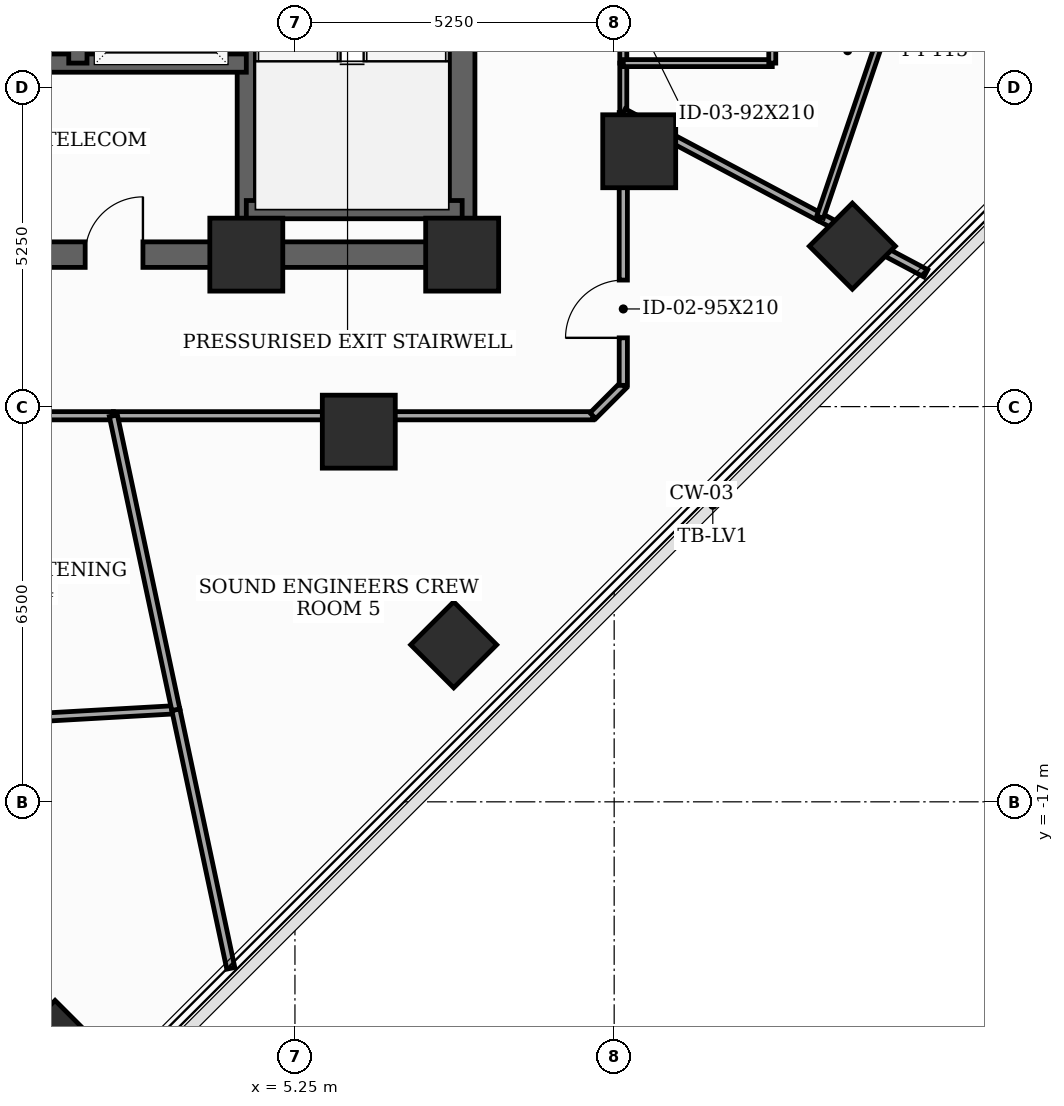
"""IFC4 building model, lengths in metres.
Left out: names, types, materials, properties, quantities, classifications, styles, units other than length and angle.
Written with IfcOpenShell. Run it as: python <this file> out.ifc"""

import sys

from ifc_helpers import new_model, si_unit, direction, frame, frame_2d, origin, origin_2d, place, context, subcontext, project, spatial, rectangle, extrude, element, fill, save


model = new_model("IFC4")
c1 = context("Model", 3, precision=1e-05, world=origin(), true_north=direction((0.0, 1.0)))
c2 = subcontext(c1, "Body", "Model", "MODEL_VIEW")
j1 = project(units=[si_unit("LENGTHUNIT", "METRE"), si_unit("PLANEANGLEUNIT", "RADIAN")], contexts=[c1])
p1 = place(None, origin())
s1 = spatial("IfcSite", under=j1, at=p1, CompositionType="ELEMENT")
p2 = place(p1, origin())
s2 = spatial("IfcBuilding", under=s1, at=p2, CompositionType="ELEMENT")
p3 = place(p2, frame((0.0, 0.0, 191.6)))
s3 = spatial("IfcBuildingStorey", under=s2, at=p3, CompositionType="ELEMENT", Elevation=191.6)
for number, where, z_axis, x_axis in (
    (1, (4.45, -8.0, 0.0), (0.0, 0.0, 1.0), (1.0, 0.0, 0.0)),
    (2, (8.0, -8.0, 0.0), (0.0, 0.0, 1.0), (1.0, 0.0, 0.0)),
    (3, (6.3, -10.912, 0.0), (0.0, 0.0, 1.0), (1.0, 0.0, 0.0)),
    (4, (10.912, -6.3, 0.0), (0.0, 0.0, 1.0), (1.0, 0.0, 0.0)),
):
    element("IfcColumn", number, at=place(p3, frame(where, z_axis=z_axis, x_axis=x_axis)), inside=s3, PredefinedType="COLUMN", context=c2, shape_type="SweptSolid", body=[
        extrude(rectangle(XDim=1.2, YDim=1.2, at=origin_2d()), origin(), (0.0, 0.0, 1.0), 3.7),
    ])
for number, where, z_axis, x_axis in (
    (5, (1.305, -20.973, 0.0), (0.0, 0.0, 1.0), (0.707, 0.707, 0.0)),
    (6, (7.861, -14.417, 0.0), (0.0, 0.0, 1.0), (0.707, 0.707, 0.0)),
    (7, (14.417, -7.861, 0.0), (0.0, 0.0, 1.0), (0.707, 0.707, 0.0)),
):
    element("IfcColumn", number, at=place(p3, frame(where, z_axis=z_axis, x_axis=x_axis)), inside=s3, PredefinedType="COLUMN", context=c2, shape_type="SweptSolid", body=[
        extrude(rectangle(XDim=1.0, YDim=1.0, at=origin_2d()), origin(), (0.0, 0.0, 1.0), 3.7),
    ])
p4 = place(p3, frame((8.0, -8.0, 0.0), z_axis=(0.0, 0.0, 1.0), x_axis=(0.0, 1.0, 0.0)))
e8 = element("IfcWall", 8, at=p4, inside=s3, PredefinedType="SHEAR", context=c2, shape_type="SweptSolid", body=[
    extrude(rectangle(XDim=16.0, YDim=0.42, at=frame_2d((8.0, 0.0))), origin(), (0.0, 0.0, 1.0), 3.5),
])
p5 = place(p4, frame((9.6, 0.0, 0.0)))
e9 = element("IfcOpeningElement", 9, at=p5, cuts=e8, PredefinedType="OPENING", context=c2, shape_type="SweptSolid", body=[
    extrude(rectangle(XDim=1.05, YDim=2.15, at=frame_2d((0.525, 1.075))), frame((0.0, 0.22, 0.0), z_axis=(0.0, -1.0, 0.0), x_axis=(1.0, 0.0, 0.0)), (0.0, 0.0, 1.0), 0.44),
])
p6 = place(p4, frame((14.389, 0.0, 0.0)))
e10 = element("IfcOpeningElement", 10, at=p6, cuts=e8, PredefinedType="OPENING", context=c2, shape_type="SweptSolid", body=[
    extrude(rectangle(XDim=0.85, YDim=2.02, at=frame_2d((0.425, 1.01))), frame((0.0, 0.22, 0.0), z_axis=(0.0, -1.0, 0.0), x_axis=(1.0, 0.0, 0.0)), (0.0, 0.0, 1.0), 0.44),
])
p7 = place(p3, frame((-8.0, -8.0, 0.0), z_axis=(0.0, 0.0, 1.0), x_axis=(1.0, 0.0, 0.0)))
e11 = element("IfcWall", 11, at=p7, inside=s3, PredefinedType="SHEAR", context=c2, shape_type="SweptSolid", body=[
    extrude(rectangle(XDim=16.0, YDim=0.42, at=frame_2d((8.0, 0.0))), origin(), (0.0, 0.0, 1.0), 3.5),
])
p8 = place(p7, frame((5.2, 0.0, 0.0)))
e12 = element("IfcOpeningElement", 12, at=p8, cuts=e11, PredefinedType="OPENING", context=c2, shape_type="SweptSolid", body=[
    extrude(rectangle(XDim=0.95, YDim=2.1, at=frame_2d((0.475, 1.05))), frame((0.0, 0.22, 0.0), z_axis=(0.0, -1.0, 0.0), x_axis=(1.0, 0.0, 0.0)), (0.0, 0.0, 1.0), 0.44),
])
p9 = place(p7, frame((9.8, 0.0, 0.0)))
e13 = element("IfcOpeningElement", 13, at=p9, cuts=e11, PredefinedType="OPENING", context=c2, shape_type="SweptSolid", body=[
    extrude(rectangle(XDim=0.95, YDim=2.1, at=frame_2d((0.475, 1.05))), frame((0.0, 0.22, 0.0), z_axis=(0.0, -1.0, 0.0), x_axis=(1.0, 0.0, 0.0)), (0.0, 0.0, 1.0), 0.44),
])
p10 = place(p3, frame((4.45, -7.79, 0.0), z_axis=(0.0, 0.0, 1.0), x_axis=(0.0, 1.0, 0.0)))
e14 = element("IfcWall", 14, at=p10, inside=s3, PredefinedType="SHEAR", context=c2, shape_type="SweptSolid", body=[
    extrude(rectangle(XDim=15.58, YDim=0.3, at=frame_2d((7.79, 0.0))), origin(), (0.0, 0.0, 1.0), 3.5),
])
p11 = place(p3, frame((4.45, -7.26, 0.0), z_axis=(0.0, 0.0, 1.0), x_axis=(1.0, 0.0, 0.0)))
e15 = element("IfcWall", 15, at=p11, inside=s3, PredefinedType="SHEAR", context=c2, shape_type="SweptSolid", body=[
    extrude(rectangle(XDim=3.55, YDim=0.3, at=frame_2d((1.775, 0.0))), origin(), (0.0, 0.0, 1.0), 3.5),
])
p12 = place(p3, frame((-4.45, -4.85, 0.0), z_axis=(0.0, 0.0, 1.0), x_axis=(1.0, 0.0, 0.0)))
e16 = element("IfcWall", 16, at=p12, inside=s3, PredefinedType="SHEAR", context=c2, shape_type="SweptSolid", body=[
    extrude(rectangle(XDim=8.9, YDim=0.3, at=frame_2d((4.45, 0.0))), origin(), (0.0, 0.0, 1.0), 3.5),
])
p13 = place(p3, frame((1.68, -4.85, 0.0), z_axis=(0.0, 0.0, 1.0), x_axis=(0.0, 1.0, 0.0)))
e17 = element("IfcWall", 17, at=p13, inside=s3, PredefinedType="SHEAR", context=c2, shape_type="SweptSolid", body=[
    extrude(rectangle(XDim=12.64, YDim=0.3, at=frame_2d((6.32, 0.0))), origin(), (0.0, 0.0, 1.0), 3.5),
])
p14 = place(p13, frame((0.55, 0.0, 0.0)))
e18 = element("IfcOpeningElement", 18, at=p14, cuts=e17, PredefinedType="OPENING", context=c2, shape_type="SweptSolid", body=[
    extrude(rectangle(XDim=1.1, YDim=2.1, at=frame_2d((0.55, 1.05))), frame((0.0, 0.16, 0.0), z_axis=(0.0, -1.0, 0.0), x_axis=(1.0, 0.0, 0.0)), (0.0, 0.0, 1.0), 0.32),
])
p15 = place(p13, frame((2.65, 0.0, 0.0)))
e19 = element("IfcOpeningElement", 19, at=p15, cuts=e17, PredefinedType="OPENING", context=c2, shape_type="SweptSolid", body=[
    extrude(rectangle(XDim=1.1, YDim=2.1, at=frame_2d((0.55, 1.05))), frame((0.0, 0.16, 0.0), z_axis=(0.0, -1.0, 0.0), x_axis=(1.0, 0.0, 0.0)), (0.0, 0.0, 1.0), 0.32),
])
p16 = place(p13, frame((4.75, 0.0, 0.0)))
e20 = element("IfcOpeningElement", 20, at=p16, cuts=e17, PredefinedType="OPENING", context=c2, shape_type="SweptSolid", body=[
    extrude(rectangle(XDim=1.1, YDim=2.1, at=frame_2d((0.55, 1.05))), frame((0.0, 0.16, 0.0), z_axis=(0.0, -1.0, 0.0), x_axis=(1.0, 0.0, 0.0)), (0.0, 0.0, 1.0), 0.32),
])
p17 = place(p13, frame((6.85, 0.0, 0.0)))
e21 = element("IfcOpeningElement", 21, at=p17, cuts=e17, PredefinedType="OPENING", context=c2, shape_type="SweptSolid", body=[
    extrude(rectangle(XDim=1.1, YDim=2.1, at=frame_2d((0.55, 1.05))), frame((0.0, 0.16, 0.0), z_axis=(0.0, -1.0, 0.0), x_axis=(1.0, 0.0, 0.0)), (0.0, 0.0, 1.0), 0.32),
])
p18 = place(p13, frame((8.95, 0.0, 0.0)))
e22 = element("IfcOpeningElement", 22, at=p18, cuts=e17, PredefinedType="OPENING", context=c2, shape_type="SweptSolid", body=[
    extrude(rectangle(XDim=1.1, YDim=2.1, at=frame_2d((0.55, 1.05))), frame((0.0, 0.16, 0.0), z_axis=(0.0, -1.0, 0.0), x_axis=(1.0, 0.0, 0.0)), (0.0, 0.0, 1.0), 0.32),
])
p19 = place(p13, frame((11.05, 0.0, 0.0)))
e23 = element("IfcOpeningElement", 23, at=p19, cuts=e17, PredefinedType="OPENING", context=c2, shape_type="SweptSolid", body=[
    extrude(rectangle(XDim=1.1, YDim=2.1, at=frame_2d((0.55, 1.05))), frame((0.0, 0.16, 0.0), z_axis=(0.0, -1.0, 0.0), x_axis=(1.0, 0.0, 0.0)), (0.0, 0.0, 1.0), 0.32),
])
p20 = place(p3, frame((-5.194, -10.65, 0.0), z_axis=(0.0, 0.0, 1.0), x_axis=(1.0, 0.0, 0.0)))
e24 = element("IfcWall", 24, at=p20, inside=s3, PredefinedType="PARTITIONING", context=c2, shape_type="SweptSolid", body=[
    extrude(rectangle(XDim=7.458, YDim=0.135, at=frame_2d((3.729, 0.0))), origin(), (0.0, 0.0, 1.0), 2.885),
])
p21 = place(p20, frame((3.254, 0.0, 0.0)))
e25 = element("IfcOpeningElement", 25, at=p21, cuts=e24, PredefinedType="OPENING", context=c2, shape_type="SweptSolid", body=[
    extrude(rectangle(XDim=0.95, YDim=2.1, at=frame_2d((0.475, 1.05))), frame((0.0, 0.077, 0.0), z_axis=(0.0, -1.0, 0.0), x_axis=(1.0, 0.0, 0.0)), (0.0, 0.0, 1.0), 0.155),
])
p22 = place(p3, frame((2.264, -10.65, 0.0), z_axis=(0.0, 0.0, 1.0), x_axis=(1.0, 0.0, 0.0)))
e26 = element("IfcWall", 26, at=p22, inside=s3, PredefinedType="PARTITIONING", context=c2, shape_type="SweptSolid", body=[
    extrude(rectangle(XDim=7.886, YDim=0.135, at=frame_2d((3.943, 0.0))), origin(), (0.0, 0.0, 1.0), 2.885),
])
p23 = place(p3, frame((10.15, -10.65, 0.0), z_axis=(0.0, 0.0, 1.0), x_axis=(0.707106781187, 0.707106781187, 0.0)))
e27 = element("IfcWall", 27, at=p23, inside=s3, PredefinedType="PARTITIONING", context=c2, shape_type="SweptSolid", body=[
    extrude(rectangle(XDim=0.707, YDim=0.135, at=frame_2d((0.354, 0.0))), origin(), (0.0, 0.0, 1.0), 3.5),
])
p24 = place(p3, frame((10.65, -10.15, 0.0), z_axis=(0.0, 0.0, 1.0), x_axis=(0.0, 1.0, 0.0)))
e28 = element("IfcWall", 28, at=p24, inside=s3, PredefinedType="PARTITIONING", context=c2, shape_type="SweptSolid", body=[
    extrude(rectangle(XDim=4.487, YDim=0.135, at=frame_2d((2.243, 0.0))), origin(), (0.0, 0.0, 1.0), 2.885),
])
p25 = place(p24, frame((0.781, 0.0, 0.0)))
e29 = element("IfcOpeningElement", 29, at=p25, cuts=e28, PredefinedType="OPENING", context=c2, shape_type="SweptSolid", body=[
    extrude(rectangle(XDim=0.95, YDim=2.1, at=frame_2d((0.475, 1.05))), frame((0.0, 0.077, 0.0), z_axis=(0.0, -1.0, 0.0), x_axis=(1.0, 0.0, 0.0)), (0.0, 0.0, 1.0), 0.155),
])
p26 = place(p3, frame((10.65, -4.85, 0.0), z_axis=(0.0, 0.0, 1.0), x_axis=(0.0, 1.0, 0.0)))
e30 = element("IfcWall", 30, at=p26, inside=s3, PredefinedType="PARTITIONING", context=c2, shape_type="SweptSolid", body=[
    extrude(rectangle(XDim=2.4, YDim=0.115, at=frame_2d((1.2, 0.0))), origin(), (0.0, 0.0, 1.0), 3.5),
])
p27 = place(p26, frame((0.74, 0.0, 0.0)))
e31 = element("IfcOpeningElement", 31, at=p27, cuts=e30, PredefinedType="OPENING", context=c2, shape_type="SweptSolid", body=[
    extrude(rectangle(XDim=0.92, YDim=2.1, at=frame_2d((0.46, 1.05))), frame((0.0, 0.067, 0.0), z_axis=(0.0, -1.0, 0.0), x_axis=(1.0, 0.0, 0.0)), (0.0, 0.0, 1.0), 0.135),
])
p28 = place(p3, frame((10.65, -5.663, 0.0), z_axis=(0.0, 0.0, 1.0), x_axis=(0.0, 1.0, 0.0)))
e32 = element("IfcWall", 32, at=p28, inside=s3, PredefinedType="PARTITIONING", context=c2, shape_type="SweptSolid", body=[
    extrude(rectangle(XDim=0.813, YDim=0.115, at=frame_2d((0.406, 0.0))), origin(), (0.0, 0.0, 1.0), 3.5),
])
p29 = place(p3, frame((3.291, -15.485, 0.0), z_axis=(0.0, 0.0, 1.0), x_axis=(-0.998402738872, -0.056497531026, 0.0)))
e33 = element("IfcWall", 33, at=p29, inside=s3, PredefinedType="PARTITIONING", context=c2, shape_type="SweptSolid", body=[
    extrude(rectangle(XDim=5.237, YDim=0.135, at=frame_2d((2.619, 0.0))), origin(), (0.0, 0.0, 1.0), 2.985),
])
p30 = place(p3, frame((4.195, -19.738, 0.0), z_axis=(0.0, 0.0, 1.0), x_axis=(-0.207883605063, 0.978153570124, 0.0)))
e34 = element("IfcWall", 34, at=p30, inside=s3, PredefinedType="PARTITIONING", context=c2, shape_type="SweptSolid", body=[
    extrude(rectangle(XDim=4.348, YDim=0.135, at=frame_2d((2.174, 0.0))), origin(), (0.0, 0.0, 1.0), 2.985),
])
p31 = place(p3, frame((3.291, -15.485, 0.0), z_axis=(0.0, 0.0, 1.0), x_axis=(-0.207784917162, 0.97817453872, 0.0)))
e35 = element("IfcWall", 35, at=p31, inside=s3, PredefinedType="PARTITIONING", context=c2, shape_type="SweptSolid", body=[
    extrude(rectangle(XDim=4.943, YDim=0.135, at=frame_2d((2.472, 0.0))), origin(), (0.0, 0.0, 1.0), 2.885),
])
p32 = place(p3, frame((13.886, -7.383, 0.0), z_axis=(0.0, 0.0, 1.0), x_axis=(-0.88302513666, 0.469325695041, 0.0)))
e36 = element("IfcWall", 36, at=p32, inside=s3, PredefinedType="PARTITIONING", context=c2, shape_type="SweptSolid", body=[
    extrude(rectangle(XDim=3.665, YDim=0.135, at=frame_2d((1.833, 0.0))), origin(), (0.0, 0.0, 1.0), 2.885),
])
p33 = place(p3, frame((15.625, -8.308, 0.0), z_axis=(0.0, 0.0, 1.0), x_axis=(-0.882966413063, 0.469436165418, 0.0)))
e37 = element("IfcWall", 37, at=p33, inside=s3, PredefinedType="PARTITIONING", context=c2, shape_type="SweptSolid", body=[
    extrude(rectangle(XDim=1.969, YDim=0.135, at=frame_2d((0.985, 0.0))), origin(), (0.0, 0.0, 1.0), 2.985),
])
p34 = place(p3, frame((10.65, -4.85, 0.0), z_axis=(0.0, 0.0, 1.0), x_axis=(1.0, 0.0, 0.0)))
e38 = element("IfcWall", 38, at=p34, inside=s3, PredefinedType="PARTITIONING", context=c2, shape_type="SweptSolid", body=[
    extrude(rectangle(XDim=2.45, YDim=0.115, at=frame_2d((1.225, 0.0))), origin(), (0.0, 0.0, 1.0), 2.885),
])
p35 = place(p3, frame((13.1, -4.85, 0.0), z_axis=(0.0, 0.0, 1.0), x_axis=(0.0, 1.0, 0.0)))
e39 = element("IfcWall", 39, at=p35, inside=s3, PredefinedType="PARTITIONING", context=c2, shape_type="SweptSolid", body=[
    extrude(rectangle(XDim=2.4, YDim=0.115, at=frame_2d((1.2, 0.0))), origin(), (0.0, 0.0, 1.0), 3.5),
])
p36 = place(p3, frame((13.886, -7.383, 0.0), z_axis=(0.0, 0.0, 1.0), x_axis=(0.321480582018, 0.946916171255, 0.0)))
e40 = element("IfcWall", 40, at=p36, inside=s3, PredefinedType="PARTITIONING", context=c2, shape_type="SweptSolid", body=[
    extrude(rectangle(XDim=5.475, YDim=0.115, at=frame_2d((2.737, 0.0))), origin(), (0.0, 0.0, 1.0), 3.5),
])
p37 = place(p9, origin())
e41 = element("IfcDoor", 41, at=p37, inside=s3, OperationType="SINGLE_SWING_RIGHT", PredefinedType="DOOR", context=c2, shape_type="SweptSolid", body=[
    extrude(rectangle(XDim=0.95, YDim=2.1, at=frame_2d((0.475, 1.05))), frame((0.0, 0.025, 0.0), z_axis=(0.0, -1.0, 0.0), x_axis=(1.0, 0.0, 0.0)), (0.0, 0.0, 1.0), 0.05),
])
fill(e13, e41)
p38 = place(p25, origin())
e42 = element("IfcDoor", 42, at=p38, inside=s3, OperationType="SINGLE_SWING_LEFT", PredefinedType="DOOR", context=c2, shape_type="SweptSolid", body=[
    extrude(rectangle(XDim=0.95, YDim=2.1, at=frame_2d((0.475, 1.05))), frame((0.0, 0.025, 0.0), z_axis=(0.0, -1.0, 0.0), x_axis=(1.0, 0.0, 0.0)), (0.0, 0.0, 1.0), 0.05),
])
fill(e29, e42)
save(model, sys.argv[1])
